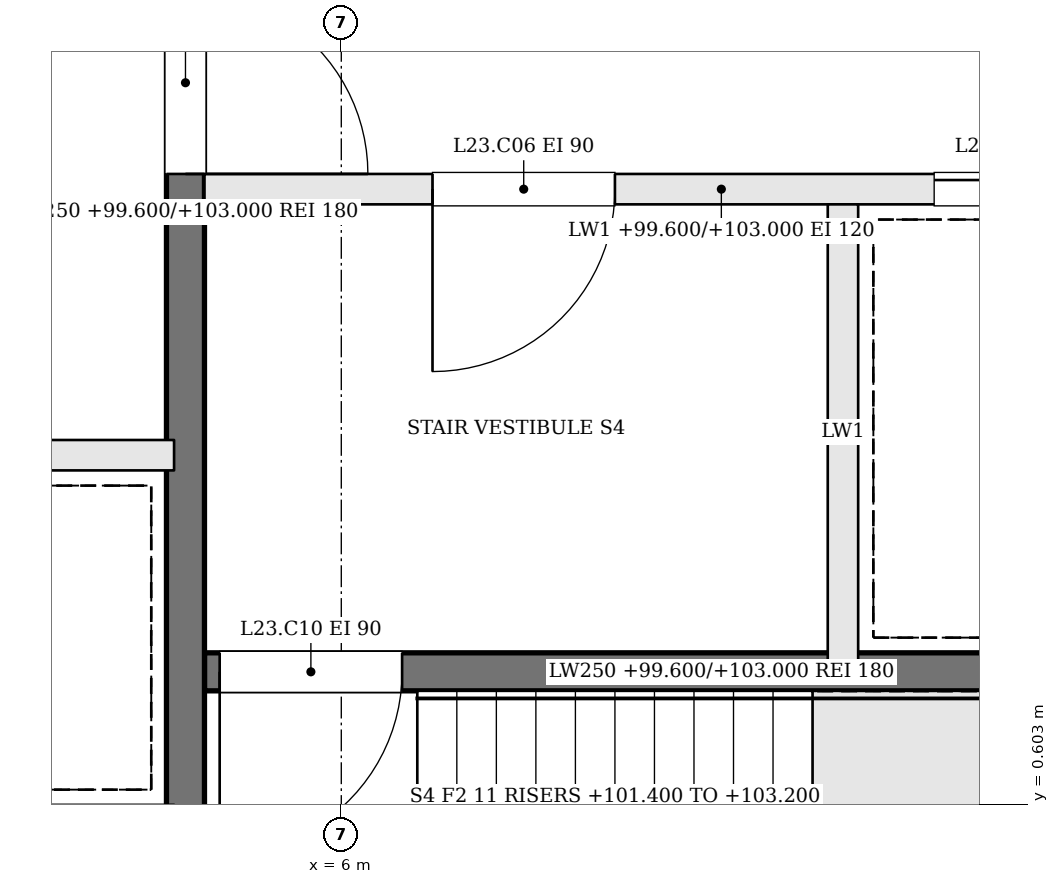
"""IFC4 building model, lengths in metres.
Left out: names, types, materials, properties, quantities, classifications, styles, units other than length and angle.
Written with IfcOpenShell. Run it as: python <this file> out.ifc"""

import sys

from ifc_helpers import new_model, si_unit, direction, frame, frame_2d, origin, place, context, subcontext, project, spatial, rectangle, extrude, element, fill, save


model = new_model("IFC4")
c1 = context("Model", 3, precision=1e-05, world=origin(), true_north=direction((0.0, 1.0)))
c2 = subcontext(c1, "Body", "Model", "MODEL_VIEW")
j1 = project(units=[si_unit("LENGTHUNIT", "METRE"), si_unit("PLANEANGLEUNIT", "RADIAN")], contexts=[c1])
p1 = place(None, origin())
s1 = spatial("IfcSite", under=j1, at=p1, CompositionType="ELEMENT")
p2 = place(p1, origin())
s2 = spatial("IfcBuilding", under=s1, at=p2, CompositionType="ELEMENT")
p3 = place(p2, frame((0.0, 0.0, 99.6)))
s3 = spatial("IfcBuildingStorey", under=s2, at=p3, CompositionType="ELEMENT", Elevation=99.6)
p4 = place(p3, frame((11.9, 4.65, 0.0), z_axis=(0.0, 0.0, 1.0), x_axis=(-1.0, 0.0, 0.0)))
e1 = element("IfcWall", 1, at=p4, inside=s3, PredefinedType="SOLIDWALL", context=c2, shape_type="SweptSolid", body=[
    extrude(rectangle(XDim=6.8, YDim=0.2, at=frame_2d((3.4, 0.0))), origin(), (0.0, 0.0, 1.0), 3.4),
])
p5 = place(p4, frame((4.1, 0.0, 0.0)))
e2 = element("IfcOpeningElement", 2, at=p5, cuts=e1, PredefinedType="OPENING", context=c2, shape_type="SweptSolid", body=[
    extrude(rectangle(XDim=1.2, YDim=2.1, at=frame_2d((0.6, 1.05))), frame((0.0, 0.11, 0.0), z_axis=(0.0, -1.0, 0.0), x_axis=(1.0, 0.0, 0.0)), (0.0, 0.0, 1.0), 0.22),
])
p6 = place(p4, frame((0.8, 0.0, 0.0)))
e3 = element("IfcOpeningElement", 3, at=p6, cuts=e1, PredefinedType="OPENING", context=c2, shape_type="SweptSolid", body=[
    extrude(rectangle(XDim=1.2, YDim=2.1, at=frame_2d((0.6, 1.05))), frame((0.0, 0.11, 0.0), z_axis=(0.0, -1.0, 0.0), x_axis=(1.0, 0.0, 0.0)), (0.0, 0.0, 1.0), 0.22),
])
p7 = place(p3, frame((11.9, 1.475, 0.0), z_axis=(0.0, 0.0, 1.0), x_axis=(-1.0, 0.0, 0.0)))
e4 = element("IfcWall", 4, at=p7, inside=s3, PredefinedType="SOLIDWALL", context=c2, shape_type="SweptSolid", body=[
    extrude(rectangle(XDim=6.8, YDim=0.25, at=frame_2d((3.4, 0.0))), origin(), (0.0, 0.0, 1.0), 3.4),
])
p8 = place(p7, frame((5.5, 0.0, 0.0)))
e5 = element("IfcOpeningElement", 5, at=p8, cuts=e4, PredefinedType="OPENING", context=c2, shape_type="SweptSolid", body=[
    extrude(rectangle(XDim=1.2, YDim=2.1, at=frame_2d((0.6, 1.05))), frame((0.0, 0.135, 0.0), z_axis=(0.0, -1.0, 0.0), x_axis=(1.0, 0.0, 0.0)), (0.0, 0.0, 1.0), 0.27),
])
p9 = place(p3, frame((9.3, 4.55, 0.0), z_axis=(0.0, 0.0, 1.0), x_axis=(0.0, -1.0, 0.0)))
e6 = element("IfcWall", 6, at=p9, inside=s3, PredefinedType="SOLIDWALL", context=c2, shape_type="SweptSolid", body=[
    extrude(rectangle(XDim=3.0, YDim=0.2, at=frame_2d((1.5, 0.0))), origin(), (0.0, 0.0, 1.0), 3.4),
])
p10 = place(p3, frame((4.975, 10.9, 0.0), z_axis=(0.0, 0.0, 1.0), x_axis=(0.0, -1.0, 0.0)))
e7 = element("IfcWall", 7, at=p10, inside=s3, PredefinedType="SOLIDWALL", context=c2, shape_type="SweptSolid", body=[
    extrude(rectangle(XDim=12.8, YDim=0.25, at=frame_2d((6.4, 0.0))), origin(), (0.0, 0.0, 1.0), 3.4),
])
p11 = place(p10, frame((4.95, 0.0, 0.0)))
e8 = element("IfcOpeningElement", 8, at=p11, cuts=e7, PredefinedType="OPENING", context=c2, shape_type="SweptSolid", body=[
    extrude(rectangle(XDim=1.2, YDim=2.1, at=frame_2d((0.6, 1.05))), frame((0.0, 0.135, 0.0), z_axis=(0.0, -1.0, 0.0), x_axis=(1.0, 0.0, 0.0)), (0.0, 0.0, 1.0), 0.27),
])
p12 = place(p3, frame((-4.9, 2.9, 0.0), z_axis=(0.0, 0.0, 1.0), x_axis=(1.0, 0.0, 0.0)))
e9 = element("IfcWall", 9, at=p12, inside=s3, PredefinedType="SOLIDWALL", context=c2, shape_type="SweptSolid", body=[
    extrude(rectangle(XDim=9.8, YDim=0.2, at=frame_2d((4.9, 0.0))), origin(), (0.0, 0.0, 1.0), 3.4),
])
p13 = place(p12, frame((0.675, 0.0, 0.0)))
e10 = element("IfcOpeningElement", 10, at=p13, cuts=e9, PredefinedType="OPENING", context=c2, shape_type="SweptSolid", body=[
    extrude(rectangle(XDim=1.1, YDim=2.1, at=frame_2d((0.55, 1.05))), frame((0.0, 0.11, 0.0), z_axis=(0.0, -1.0, 0.0), x_axis=(1.0, 0.0, 0.0)), (0.0, 0.0, 1.0), 0.22),
])
p14 = place(p12, frame((3.125, 0.0, 0.0)))
e11 = element("IfcOpeningElement", 11, at=p14, cuts=e9, PredefinedType="OPENING", context=c2, shape_type="SweptSolid", body=[
    extrude(rectangle(XDim=1.1, YDim=2.1, at=frame_2d((0.55, 1.05))), frame((0.0, 0.11, 0.0), z_axis=(0.0, -1.0, 0.0), x_axis=(1.0, 0.0, 0.0)), (0.0, 0.0, 1.0), 0.22),
])
p15 = place(p11, origin())
e12 = element("IfcDoor", 12, at=p15, inside=s3, OperationType="SINGLE_SWING_RIGHT", PredefinedType="DOOR", context=c2, shape_type="SweptSolid", body=[
    extrude(rectangle(XDim=1.2, YDim=2.1, at=frame_2d((0.6, 1.05))), frame((0.0, 0.025, 0.0), z_axis=(0.0, -1.0, 0.0), x_axis=(1.0, 0.0, 0.0)), (0.0, 0.0, 1.0), 0.05),
])
fill(e8, e12)
p16 = place(p5, origin())
e13 = element("IfcDoor", 13, at=p16, inside=s3, OperationType="SINGLE_SWING_RIGHT", PredefinedType="DOOR", context=c2, shape_type="SweptSolid", body=[
    extrude(rectangle(XDim=1.2, YDim=2.1, at=frame_2d((0.6, 1.05))), frame((0.0, 0.025, 0.0), z_axis=(0.0, -1.0, 0.0), x_axis=(1.0, 0.0, 0.0)), (0.0, 0.0, 1.0), 0.05),
])
fill(e2, e13)
p17 = place(p8, origin())
e14 = element("IfcDoor", 14, at=p17, inside=s3, OperationType="SINGLE_SWING_RIGHT", PredefinedType="DOOR", context=c2, shape_type="SweptSolid", body=[
    extrude(rectangle(XDim=1.2, YDim=2.1, at=frame_2d((0.6, 1.05))), frame((0.0, 0.025, 0.0), z_axis=(0.0, -1.0, 0.0), x_axis=(1.0, 0.0, 0.0)), (0.0, 0.0, 1.0), 0.05),
])
fill(e5, e14)
p18 = place(p6, origin())
e15 = element("IfcDoor", 15, at=p18, inside=s3, OperationType="SLIDING_TO_RIGHT", PredefinedType="DOOR", context=c2, shape_type="SweptSolid", body=[
    extrude(rectangle(XDim=1.2, YDim=2.1, at=frame_2d((0.6, 1.05))), frame((0.0, 0.025, 0.0), z_axis=(0.0, -1.0, 0.0), x_axis=(1.0, 0.0, 0.0)), (0.0, 0.0, 1.0), 0.05),
])
fill(e3, e15)
save(model, sys.argv[1])
